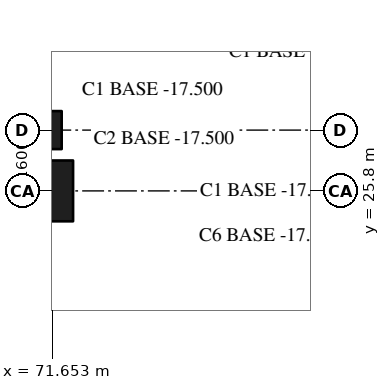
"""IFC4 building model, lengths in metres.
Left out: names, types, materials, properties, quantities, classifications, styles, units other than length and angle.
Written with IfcOpenShell. Run it as: python <this file> out.ifc"""

import sys

from ifc_helpers import new_model, si_unit, direction, frame, origin, origin_2d, place, context, subcontext, project, spatial, rectangle, extrude, element, save


model = new_model("IFC4")
c1 = context("Model", 3, precision=1e-05, world=origin(), true_north=direction((0.0, 1.0)))
c2 = subcontext(c1, "Body", "Model", "MODEL_VIEW")
j1 = project(units=[si_unit("LENGTHUNIT", "METRE"), si_unit("PLANEANGLEUNIT", "RADIAN")], contexts=[c1])
p1 = place(None, origin())
s1 = spatial("IfcSite", under=j1, at=p1, CompositionType="ELEMENT")
p2 = place(p1, origin())
s2 = spatial("IfcBuilding", under=s1, at=p2, CompositionType="ELEMENT")
p3 = place(p2, frame((0.0, 0.0, -17.0)))
s3 = spatial("IfcBuildingStorey", under=s2, at=p3, CompositionType="ELEMENT", Elevation=-17.0)
p4 = place(p3, frame((71.4, 25.8, -0.5), z_axis=(0.0, 0.0, 1.0), x_axis=(1.0, 0.0, 0.0)))
e1 = element("IfcColumn", 1, at=p4, inside=s3, PredefinedType="COLUMN", context=c2, shape_type="SweptSolid", body=[
    extrude(rectangle(XDim=1.6, YDim=1.6, at=origin_2d()), origin(), (0.0, 0.0, 1.0), 5.5),
])
p5 = place(p3, frame((71.4, 27.4, -0.5), z_axis=(0.0, 0.0, 1.0), x_axis=(1.0, 0.0, 0.0)))
e2 = element("IfcColumn", 2, at=p5, inside=s3, PredefinedType="COLUMN", context=c2, shape_type="SweptSolid", body=[
    extrude(rectangle(XDim=1.0, YDim=1.0, at=origin_2d()), origin(), (0.0, 0.0, 1.0), 5.5),
])
save(model, sys.argv[1])
